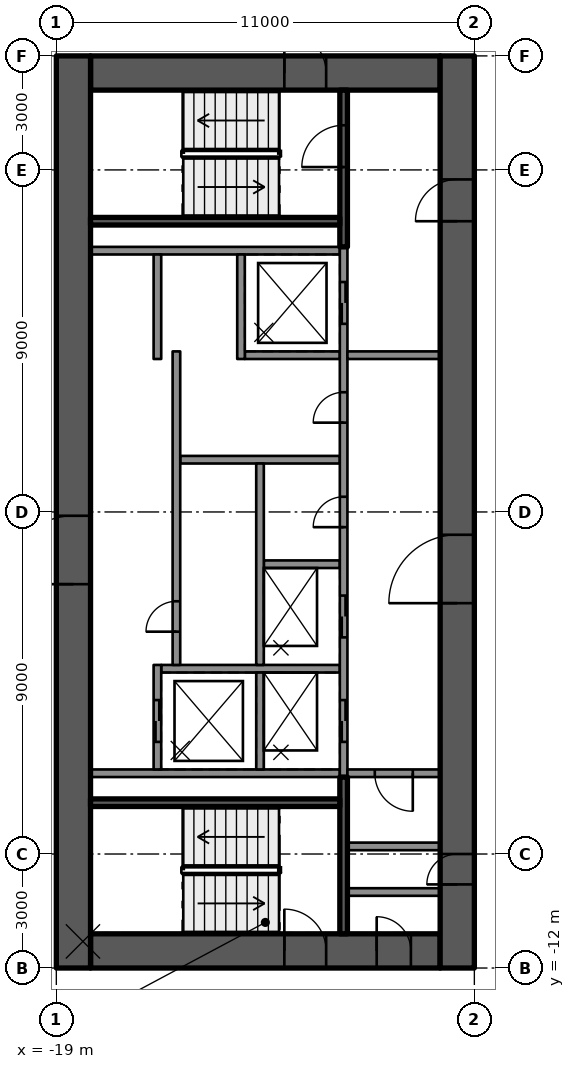
"""IFC4 building model, lengths in metres.
Left out: names, types, materials, properties, quantities, classifications, styles, units other than length and angle.
Written with IfcOpenShell. Run it as: python <this file> out.ifc"""

import sys

from ifc_helpers import new_model, si_unit, direction, frame, frame_2d, origin, place, context, subcontext, project, spatial, rectangle, extrude, element, fill, save


model = new_model("IFC4")
c1 = context("Model", 3, precision=1e-05, world=origin(), true_north=direction((0.0, 1.0)))
c2 = subcontext(c1, "Body", "Model", "MODEL_VIEW")
j1 = project(units=[si_unit("LENGTHUNIT", "METRE"), si_unit("PLANEANGLEUNIT", "RADIAN")], contexts=[c1])
p1 = place(None, origin())
s1 = spatial("IfcSite", under=j1, at=p1, CompositionType="ELEMENT")
p2 = place(p1, origin())
s2 = spatial("IfcBuilding", under=s1, at=p2, CompositionType="ELEMENT")
p3 = place(p2, frame((0.0, 0.0, 289.4)))
s3 = spatial("IfcBuildingStorey", under=s2, at=p3, CompositionType="ELEMENT", Elevation=289.4)
p4 = place(p3, frame((-18.1, 11.55, 0.0), z_axis=(0.0, 0.0, 1.0), x_axis=(1.0, 0.0, 0.0)))
e1 = element("IfcWall", 1, at=p4, inside=s3, PredefinedType="SHEAR", context=c2, shape_type="SweptSolid", body=[
    extrude(rectangle(XDim=9.2, YDim=0.9, at=frame_2d((4.6, 0.0))), origin(), (0.0, 0.0, 1.0), 3.5),
])
p5 = place(p4, frame((5.1, 0.0, 0.0)))
e2 = element("IfcOpeningElement", 2, at=p5, cuts=e1, PredefinedType="OPENING", context=c2, shape_type="SweptSolid", body=[
    extrude(rectangle(XDim=1.1, YDim=2.1, at=frame_2d((0.55, 1.05))), frame((0.0, 0.46, 0.0), z_axis=(0.0, -1.0, 0.0), x_axis=(1.0, 0.0, 0.0)), (0.0, 0.0, 1.0), 0.92),
])
p6 = place(p3, frame((-18.1, -11.55, 0.0), z_axis=(0.0, 0.0, 1.0), x_axis=(1.0, 0.0, 0.0)))
e3 = element("IfcWall", 3, at=p6, inside=s3, PredefinedType="SHEAR", context=c2, shape_type="SweptSolid", body=[
    extrude(rectangle(XDim=9.2, YDim=0.9, at=frame_2d((4.6, 0.0))), origin(), (0.0, 0.0, 1.0), 3.5),
])
p7 = place(p6, frame((5.1, 0.0, 0.0)))
e4 = element("IfcOpeningElement", 4, at=p7, cuts=e3, PredefinedType="OPENING", context=c2, shape_type="SweptSolid", body=[
    extrude(rectangle(XDim=1.1, YDim=2.1, at=frame_2d((0.55, 1.05))), frame((0.0, 0.46, 0.0), z_axis=(0.0, -1.0, 0.0), x_axis=(1.0, 0.0, 0.0)), (0.0, 0.0, 1.0), 0.92),
])
p8 = place(p6, frame((7.53, 0.0, 0.0)))
e5 = element("IfcOpeningElement", 5, at=p8, cuts=e3, PredefinedType="OPENING", context=c2, shape_type="SweptSolid", body=[
    extrude(rectangle(XDim=0.9, YDim=2.1, at=frame_2d((0.45, 1.05))), frame((0.0, 0.46, 0.0), z_axis=(0.0, -1.0, 0.0), x_axis=(1.0, 0.0, 0.0)), (0.0, 0.0, 1.0), 0.92),
])
p9 = place(p3, frame((-18.55, -12.0, 0.0), z_axis=(0.0, 0.0, 1.0), x_axis=(0.0, 1.0, 0.0)))
e6 = element("IfcWall", 6, at=p9, inside=s3, PredefinedType="SHEAR", context=c2, shape_type="SweptSolid", body=[
    extrude(rectangle(XDim=24.0, YDim=0.9, at=frame_2d((12.0, 0.0))), origin(), (0.0, 0.0, 1.0), 3.5),
])
p10 = place(p9, frame((10.1, 0.0, 0.0)))
e7 = element("IfcOpeningElement", 7, at=p10, cuts=e6, PredefinedType="OPENING", context=c2, shape_type="SweptSolid", body=[
    extrude(rectangle(XDim=1.8, YDim=2.1, at=frame_2d((0.9, 1.05))), frame((0.0, 0.46, 0.0), z_axis=(0.0, -1.0, 0.0), x_axis=(1.0, 0.0, 0.0)), (0.0, 0.0, 1.0), 0.92),
])
p11 = place(p3, frame((-8.45, -12.0, 0.0), z_axis=(0.0, 0.0, 1.0), x_axis=(0.0, 1.0, 0.0)))
e8 = element("IfcWall", 8, at=p11, inside=s3, PredefinedType="SHEAR", context=c2, shape_type="SweptSolid", body=[
    extrude(rectangle(XDim=24.0, YDim=0.9, at=frame_2d((12.0, 0.0))), origin(), (0.0, 0.0, 1.0), 3.5),
])
p12 = place(p11, frame((9.6, 0.0, 0.0)))
e9 = element("IfcOpeningElement", 9, at=p12, cuts=e8, PredefinedType="OPENING", context=c2, shape_type="SweptSolid", body=[
    extrude(rectangle(XDim=1.8, YDim=2.1, at=frame_2d((0.9, 1.05))), frame((0.0, 0.46, 0.0), z_axis=(0.0, -1.0, 0.0), x_axis=(1.0, 0.0, 0.0)), (0.0, 0.0, 1.0), 0.92),
])
p13 = place(p11, frame((19.65, 0.0, 0.0)))
e10 = element("IfcOpeningElement", 10, at=p13, cuts=e8, PredefinedType="OPENING", context=c2, shape_type="SweptSolid", body=[
    extrude(rectangle(XDim=1.1, YDim=2.1, at=frame_2d((0.55, 1.05))), frame((0.0, 0.46, 0.0), z_axis=(0.0, -1.0, 0.0), x_axis=(1.0, 0.0, 0.0)), (0.0, 0.0, 1.0), 0.92),
])
p14 = place(p11, frame((2.2, 0.0, 0.0)))
e11 = element("IfcOpeningElement", 11, at=p14, cuts=e8, PredefinedType="OPENING", context=c2, shape_type="SweptSolid", body=[
    extrude(rectangle(XDim=0.8, YDim=2.1, at=frame_2d((0.4, 1.05))), frame((0.0, 0.46, 0.0), z_axis=(0.0, -1.0, 0.0), x_axis=(1.0, 0.0, 0.0)), (0.0, 0.0, 1.0), 0.92),
])
for number, where, z_axis, x_axis in (
    (12, (-11.54, 6.875, 0.0), (0.0, 0.0, 1.0), (-1.0, 0.0, 0.0)),
    (13, (-11.54, -6.875, 0.0), (0.0, 0.0, 1.0), (-1.0, 0.0, 0.0)),
):
    element("IfcWall", number, at=place(p3, frame(where, z_axis=z_axis, x_axis=x_axis)), inside=s3, PredefinedType="SOLIDWALL", context=c2, shape_type="SweptSolid", body=[
        extrude(rectangle(XDim=6.56, YDim=0.2, at=frame_2d((3.28, 0.0))), origin(), (0.0, 0.0, 1.0), 3.09),
    ])
p15 = place(p3, frame((-11.54, -4.125, 0.0), z_axis=(0.0, 0.0, 1.0), x_axis=(-1.0, 0.0, 0.0)))
e14 = element("IfcWall", 14, at=p15, inside=s3, PredefinedType="SOLIDWALL", context=c2, shape_type="SweptSolid", body=[
    extrude(rectangle(XDim=4.7, YDim=0.2, at=frame_2d((2.35, 0.0))), origin(), (0.0, 0.0, 1.0), 3.09),
])
p16 = place(p3, frame((-11.54, -1.375, 0.0), z_axis=(0.0, 0.0, 1.0), x_axis=(-1.0, 0.0, 0.0)))
e15 = element("IfcWall", 15, at=p16, inside=s3, PredefinedType="SOLIDWALL", context=c2, shape_type="SweptSolid", body=[
    extrude(rectangle(XDim=2.0, YDim=0.2, at=frame_2d((1.0, 0.0))), origin(), (0.0, 0.0, 1.0), 3.09),
])
p17 = place(p3, frame((-11.54, 1.375, 0.0), z_axis=(0.0, 0.0, 1.0), x_axis=(-1.0, 0.0, 0.0)))
e16 = element("IfcWall", 16, at=p17, inside=s3, PredefinedType="SOLIDWALL", context=c2, shape_type="SweptSolid", body=[
    extrude(rectangle(XDim=4.2, YDim=0.2, at=frame_2d((2.1, 0.0))), origin(), (0.0, 0.0, 1.0), 3.09),
])
p18 = place(p3, frame((-11.54, 4.125, 0.0), z_axis=(0.0, 0.0, 1.0), x_axis=(-1.0, 0.0, 0.0)))
e17 = element("IfcWall", 17, at=p18, inside=s3, PredefinedType="SOLIDWALL", context=c2, shape_type="SweptSolid", body=[
    extrude(rectangle(XDim=2.5, YDim=0.2, at=frame_2d((1.25, 0.0))), origin(), (0.0, 0.0, 1.0), 3.09),
])
p19 = place(p3, frame((-11.44, -6.975, 0.0), z_axis=(0.0, 0.0, 1.0), x_axis=(0.0, 1.0, 0.0)))
e18 = element("IfcWall", 18, at=p19, inside=s3, PredefinedType="SOLIDWALL", context=c2, shape_type="SweptSolid", body=[
    extrude(rectangle(XDim=13.95, YDim=0.2, at=frame_2d((6.975, 0.0))), origin(), (0.0, 0.0, 1.0), 3.09),
])
p20 = place(p19, frame((0.925, 0.0, 0.0)))
e19 = element("IfcOpeningElement", 19, at=p20, cuts=e18, PredefinedType="OPENING", context=c2, shape_type="SweptSolid", body=[
    extrude(rectangle(XDim=1.1, YDim=2.1, at=frame_2d((0.55, 1.05))), frame((0.0, 0.11, 0.0), z_axis=(0.0, -1.0, 0.0), x_axis=(1.0, 0.0, 0.0)), (0.0, 0.0, 1.0), 0.22),
])
p21 = place(p19, frame((3.675, 0.0, 0.0)))
e20 = element("IfcOpeningElement", 20, at=p21, cuts=e18, PredefinedType="OPENING", context=c2, shape_type="SweptSolid", body=[
    extrude(rectangle(XDim=1.1, YDim=2.1, at=frame_2d((0.55, 1.05))), frame((0.0, 0.11, 0.0), z_axis=(0.0, -1.0, 0.0), x_axis=(1.0, 0.0, 0.0)), (0.0, 0.0, 1.0), 0.22),
])
p22 = place(p19, frame((11.925, 0.0, 0.0)))
e21 = element("IfcOpeningElement", 21, at=p22, cuts=e18, PredefinedType="OPENING", context=c2, shape_type="SweptSolid", body=[
    extrude(rectangle(XDim=1.1, YDim=2.1, at=frame_2d((0.55, 1.05))), frame((0.0, 0.11, 0.0), z_axis=(0.0, -1.0, 0.0), x_axis=(1.0, 0.0, 0.0)), (0.0, 0.0, 1.0), 0.22),
])
p23 = place(p19, frame((6.575, 0.0, 0.0)))
e22 = element("IfcOpeningElement", 22, at=p23, cuts=e18, PredefinedType="OPENING", context=c2, shape_type="SweptSolid", body=[
    extrude(rectangle(XDim=0.8, YDim=2.1, at=frame_2d((0.4, 1.05))), frame((0.0, 0.11, 0.0), z_axis=(0.0, -1.0, 0.0), x_axis=(1.0, 0.0, 0.0)), (0.0, 0.0, 1.0), 0.22),
])
p24 = place(p19, frame((9.325, 0.0, 0.0)))
e23 = element("IfcOpeningElement", 23, at=p24, cuts=e18, PredefinedType="OPENING", context=c2, shape_type="SweptSolid", body=[
    extrude(rectangle(XDim=0.8, YDim=2.1, at=frame_2d((0.4, 1.05))), frame((0.0, 0.11, 0.0), z_axis=(0.0, -1.0, 0.0), x_axis=(1.0, 0.0, 0.0)), (0.0, 0.0, 1.0), 0.22),
])
p25 = place(p3, frame((-13.64, -6.775, 0.0), z_axis=(0.0, 0.0, 1.0), x_axis=(0.0, 1.0, 0.0)))
e24 = element("IfcWall", 24, at=p25, inside=s3, PredefinedType="SOLIDWALL", context=c2, shape_type="SweptSolid", body=[
    extrude(rectangle(XDim=2.55, YDim=0.2, at=frame_2d((1.275, 0.0))), origin(), (0.0, 0.0, 1.0), 3.09),
])
p26 = place(p3, frame((-13.64, -4.025, 0.0), z_axis=(0.0, 0.0, 1.0), x_axis=(0.0, 1.0, 0.0)))
e25 = element("IfcWall", 25, at=p26, inside=s3, PredefinedType="SOLIDWALL", context=c2, shape_type="SweptSolid", body=[
    extrude(rectangle(XDim=5.3, YDim=0.2, at=frame_2d((2.65, 0.0))), origin(), (0.0, 0.0, 1.0), 3.09),
])
p27 = place(p3, frame((-14.14, 4.025, 0.0), z_axis=(0.0, 0.0, 1.0), x_axis=(0.0, 1.0, 0.0)))
e26 = element("IfcWall", 26, at=p27, inside=s3, PredefinedType="SOLIDWALL", context=c2, shape_type="SweptSolid", body=[
    extrude(rectangle(XDim=2.75, YDim=0.2, at=frame_2d((1.375, 0.0))), origin(), (0.0, 0.0, 1.0), 3.09),
])
p28 = place(p3, frame((-16.34, -6.775, 0.0), z_axis=(0.0, 0.0, 1.0), x_axis=(0.0, 1.0, 0.0)))
e27 = element("IfcWall", 27, at=p28, inside=s3, PredefinedType="SOLIDWALL", context=c2, shape_type="SweptSolid", body=[
    extrude(rectangle(XDim=2.75, YDim=0.2, at=frame_2d((1.375, 0.0))), origin(), (0.0, 0.0, 1.0), 3.09),
])
p29 = place(p28, frame((0.725, 0.0, 0.0)))
e28 = element("IfcOpeningElement", 28, at=p29, cuts=e27, PredefinedType="OPENING", context=c2, shape_type="SweptSolid", body=[
    extrude(rectangle(XDim=1.1, YDim=2.1, at=frame_2d((0.55, 1.05))), frame((0.0, 0.11, 0.0), z_axis=(0.0, -1.0, 0.0), x_axis=(1.0, 0.0, 0.0)), (0.0, 0.0, 1.0), 0.22),
])
p30 = place(p3, frame((-15.84, -4.025, 0.0), z_axis=(0.0, 0.0, 1.0), x_axis=(0.0, 1.0, 0.0)))
e29 = element("IfcWall", 29, at=p30, inside=s3, PredefinedType="SOLIDWALL", context=c2, shape_type="SweptSolid", body=[
    extrude(rectangle(XDim=8.25, YDim=0.2, at=frame_2d((4.125, 0.0))), origin(), (0.0, 0.0, 1.0), 3.09),
])
p31 = place(p30, frame((0.875, 0.0, 0.0)))
e30 = element("IfcOpeningElement", 30, at=p31, cuts=e29, PredefinedType="OPENING", context=c2, shape_type="SweptSolid", body=[
    extrude(rectangle(XDim=0.8, YDim=2.1, at=frame_2d((0.4, 1.05))), frame((0.0, 0.11, 0.0), z_axis=(0.0, -1.0, 0.0), x_axis=(1.0, 0.0, 0.0)), (0.0, 0.0, 1.0), 0.22),
])
p32 = place(p3, frame((-16.34, 4.025, 0.0), z_axis=(0.0, 0.0, 1.0), x_axis=(0.0, 1.0, 0.0)))
e31 = element("IfcWall", 31, at=p32, inside=s3, PredefinedType="SOLIDWALL", context=c2, shape_type="SweptSolid", body=[
    extrude(rectangle(XDim=2.75, YDim=0.2, at=frame_2d((1.375, 0.0))), origin(), (0.0, 0.0, 1.0), 3.09),
])
p33 = place(p3, frame((-11.44, 6.975, 0.0), z_axis=(0.0, 0.0, 1.0), x_axis=(0.0, 1.0, 0.0)))
e32 = element("IfcWall", 32, at=p33, inside=s3, PredefinedType="SOLIDWALL", context=c2, shape_type="SweptSolid", body=[
    extrude(rectangle(XDim=4.125, YDim=0.2, at=frame_2d((2.062, 0.0))), origin(), (0.0, 0.0, 1.0), 3.09),
])
p34 = place(p33, frame((2.1, 0.0, 0.0)))
e33 = element("IfcOpeningElement", 33, at=p34, cuts=e32, PredefinedType="OPENING", context=c2, shape_type="SweptSolid", body=[
    extrude(rectangle(XDim=1.1, YDim=2.1, at=frame_2d((0.55, 1.05))), frame((0.0, 0.11, 0.0), z_axis=(0.0, -1.0, 0.0), x_axis=(1.0, 0.0, 0.0)), (0.0, 0.0, 1.0), 0.22),
])
p35 = place(p3, frame((-11.54, 7.65, 0.0), z_axis=(0.0, 0.0, 1.0), x_axis=(-1.0, 0.0, 0.0)))
e34 = element("IfcWall", 34, at=p35, inside=s3, PredefinedType="SOLIDWALL", context=c2, shape_type="SweptSolid", body=[
    extrude(rectangle(XDim=6.56, YDim=0.2, at=frame_2d((3.28, 0.0))), origin(), (0.0, 0.0, 1.0), 3.09),
])
p36 = place(p3, frame((-11.44, -11.1, 0.0), z_axis=(0.0, 0.0, 1.0), x_axis=(0.0, 1.0, 0.0)))
e35 = element("IfcWall", 35, at=p36, inside=s3, PredefinedType="SOLIDWALL", context=c2, shape_type="SweptSolid", body=[
    extrude(rectangle(XDim=4.125, YDim=0.2, at=frame_2d((2.062, 0.0))), origin(), (0.0, 0.0, 1.0), 3.09),
])
p37 = place(p3, frame((-11.54, -7.65, 0.0), z_axis=(0.0, 0.0, 1.0), x_axis=(-1.0, 0.0, 0.0)))
e36 = element("IfcWall", 36, at=p37, inside=s3, PredefinedType="SOLIDWALL", context=c2, shape_type="SweptSolid", body=[
    extrude(rectangle(XDim=6.56, YDim=0.2, at=frame_2d((3.28, 0.0))), origin(), (0.0, 0.0, 1.0), 3.09),
])
p38 = place(p3, frame((-8.9, 4.125, 0.0), z_axis=(0.0, 0.0, 1.0), x_axis=(-1.0, 0.0, 0.0)))
e37 = element("IfcWall", 37, at=p38, inside=s3, PredefinedType="PARTITIONING", context=c2, shape_type="SweptSolid", body=[
    extrude(rectangle(XDim=2.44, YDim=0.2, at=frame_2d((1.22, 0.0))), origin(), (0.0, 0.0, 1.0), 3.09),
])
p39 = place(p3, frame((-8.9, -6.875, 0.0), z_axis=(0.0, 0.0, 1.0), x_axis=(-1.0, 0.0, 0.0)))
e38 = element("IfcWall", 38, at=p39, inside=s3, PredefinedType="PARTITIONING", context=c2, shape_type="SweptSolid", body=[
    extrude(rectangle(XDim=2.44, YDim=0.2, at=frame_2d((1.22, 0.0))), origin(), (0.0, 0.0, 1.0), 3.09),
])
p40 = place(p39, frame((0.72, 0.0, 0.0)))
e39 = element("IfcOpeningElement", 39, at=p40, cuts=e38, PredefinedType="OPENING", context=c2, shape_type="SweptSolid", body=[
    extrude(rectangle(XDim=1.0, YDim=2.1, at=frame_2d((0.5, 1.05))), frame((0.0, 0.11, 0.0), z_axis=(0.0, -1.0, 0.0), x_axis=(1.0, 0.0, 0.0)), (0.0, 0.0, 1.0), 0.22),
])
for number, where, z_axis, x_axis in (
    (40, (-8.9, -10.0, 0.0), (0.0, 0.0, 1.0), (-1.0, 0.0, 0.0)),
    (41, (-8.9, -8.8, 0.0), (0.0, 0.0, 1.0), (-1.0, 0.0, 0.0)),
):
    element("IfcWall", number, at=place(p3, frame(where, z_axis=z_axis, x_axis=x_axis)), inside=s3, PredefinedType="PARTITIONING", context=c2, shape_type="SweptSolid", body=[
        extrude(rectangle(XDim=2.44, YDim=0.2, at=frame_2d((1.22, 0.0))), origin(), (0.0, 0.0, 1.0), 3.09),
    ])
p41 = place(p20, origin())
e42 = element("IfcDoor", 42, at=p41, inside=s3, OperationType="DOUBLE_DOOR_SLIDING", PredefinedType="DOOR", context=c2, shape_type="SweptSolid", body=[
    extrude(rectangle(XDim=1.1, YDim=2.1, at=frame_2d((0.55, 1.05))), frame((0.0, 0.025, 0.0), z_axis=(0.0, -1.0, 0.0), x_axis=(1.0, 0.0, 0.0)), (0.0, 0.0, 1.0), 0.05),
])
fill(e19, e42)
p42 = place(p29, origin())
e43 = element("IfcDoor", 43, at=p42, inside=s3, OperationType="DOUBLE_DOOR_SLIDING", PredefinedType="DOOR", context=c2, shape_type="SweptSolid", body=[
    extrude(rectangle(XDim=1.1, YDim=2.1, at=frame_2d((0.55, 1.05))), frame((0.0, 0.025, 0.0), z_axis=(0.0, -1.0, 0.0), x_axis=(1.0, 0.0, 0.0)), (0.0, 0.0, 1.0), 0.05),
])
fill(e28, e43)
p43 = place(p21, origin())
e44 = element("IfcDoor", 44, at=p43, inside=s3, OperationType="DOUBLE_DOOR_SLIDING", PredefinedType="DOOR", context=c2, shape_type="SweptSolid", body=[
    extrude(rectangle(XDim=1.1, YDim=2.1, at=frame_2d((0.55, 1.05))), frame((0.0, 0.025, 0.0), z_axis=(0.0, -1.0, 0.0), x_axis=(1.0, 0.0, 0.0)), (0.0, 0.0, 1.0), 0.05),
])
fill(e20, e44)
p44 = place(p22, origin())
e45 = element("IfcDoor", 45, at=p44, inside=s3, OperationType="DOUBLE_DOOR_SLIDING", PredefinedType="DOOR", context=c2, shape_type="SweptSolid", body=[
    extrude(rectangle(XDim=1.1, YDim=2.1, at=frame_2d((0.55, 1.05))), frame((0.0, 0.025, 0.0), z_axis=(0.0, -1.0, 0.0), x_axis=(1.0, 0.0, 0.0)), (0.0, 0.0, 1.0), 0.05),
])
fill(e21, e45)
p45 = place(p31, origin())
e46 = element("IfcDoor", 46, at=p45, inside=s3, OperationType="SINGLE_SWING_LEFT", PredefinedType="DOOR", context=c2, shape_type="SweptSolid", body=[
    extrude(rectangle(XDim=0.8, YDim=2.1, at=frame_2d((0.4, 1.05))), frame((0.0, 0.025, 0.0), z_axis=(0.0, -1.0, 0.0), x_axis=(1.0, 0.0, 0.0)), (0.0, 0.0, 1.0), 0.05),
])
fill(e30, e46)
p46 = place(p23, origin())
e47 = element("IfcDoor", 47, at=p46, inside=s3, OperationType="SINGLE_SWING_LEFT", PredefinedType="DOOR", context=c2, shape_type="SweptSolid", body=[
    extrude(rectangle(XDim=0.8, YDim=2.1, at=frame_2d((0.4, 1.05))), frame((0.0, 0.025, 0.0), z_axis=(0.0, -1.0, 0.0), x_axis=(1.0, 0.0, 0.0)), (0.0, 0.0, 1.0), 0.05),
])
fill(e22, e47)
p47 = place(p24, origin())
e48 = element("IfcDoor", 48, at=p47, inside=s3, OperationType="SINGLE_SWING_LEFT", PredefinedType="DOOR", context=c2, shape_type="SweptSolid", body=[
    extrude(rectangle(XDim=0.8, YDim=2.1, at=frame_2d((0.4, 1.05))), frame((0.0, 0.025, 0.0), z_axis=(0.0, -1.0, 0.0), x_axis=(1.0, 0.0, 0.0)), (0.0, 0.0, 1.0), 0.05),
])
fill(e23, e48)
p48 = place(p12, origin())
e49 = element("IfcDoor", 49, at=p48, inside=s3, OperationType="SINGLE_SWING_LEFT", PredefinedType="DOOR", context=c2, shape_type="SweptSolid", body=[
    extrude(rectangle(XDim=1.8, YDim=2.1, at=frame_2d((0.9, 1.05))), frame((0.0, 0.025, 0.0), z_axis=(0.0, -1.0, 0.0), x_axis=(1.0, 0.0, 0.0)), (0.0, 0.0, 1.0), 0.05),
])
fill(e9, e49)
p49 = place(p10, origin())
e50 = element("IfcDoor", 50, at=p49, inside=s3, OperationType="SINGLE_SWING_LEFT", PredefinedType="DOOR", context=c2, shape_type="SweptSolid", body=[
    extrude(rectangle(XDim=1.8, YDim=2.1, at=frame_2d((0.9, 1.05))), frame((0.0, 0.025, 0.0), z_axis=(0.0, -1.0, 0.0), x_axis=(1.0, 0.0, 0.0)), (0.0, 0.0, 1.0), 0.05),
])
fill(e7, e50)
p50 = place(p13, origin())
e51 = element("IfcDoor", 51, at=p50, inside=s3, OperationType="SINGLE_SWING_RIGHT", PredefinedType="DOOR", context=c2, shape_type="SweptSolid", body=[
    extrude(rectangle(XDim=1.1, YDim=2.1, at=frame_2d((0.55, 1.05))), frame((0.0, 0.025, 0.0), z_axis=(0.0, -1.0, 0.0), x_axis=(1.0, 0.0, 0.0)), (0.0, 0.0, 1.0), 0.05),
])
fill(e10, e51)
p51 = place(p5, origin())
e52 = element("IfcDoor", 52, at=p51, inside=s3, OperationType="SINGLE_SWING_RIGHT", PredefinedType="DOOR", context=c2, shape_type="SweptSolid", body=[
    extrude(rectangle(XDim=1.1, YDim=2.1, at=frame_2d((0.55, 1.05))), frame((0.0, 0.025, 0.0), z_axis=(0.0, -1.0, 0.0), x_axis=(1.0, 0.0, 0.0)), (0.0, 0.0, 1.0), 0.05),
])
fill(e2, e52)
p52 = place(p7, origin())
e53 = element("IfcDoor", 53, at=p52, inside=s3, OperationType="SINGLE_SWING_RIGHT", PredefinedType="DOOR", context=c2, shape_type="SweptSolid", body=[
    extrude(rectangle(XDim=1.1, YDim=2.1, at=frame_2d((0.55, 1.05))), frame((0.0, 0.025, 0.0), z_axis=(0.0, -1.0, 0.0), x_axis=(1.0, 0.0, 0.0)), (0.0, 0.0, 1.0), 0.05),
])
fill(e4, e53)
p53 = place(p34, origin())
e54 = element("IfcDoor", 54, at=p53, inside=s3, OperationType="SINGLE_SWING_RIGHT", PredefinedType="DOOR", context=c2, shape_type="SweptSolid", body=[
    extrude(rectangle(XDim=1.1, YDim=2.1, at=frame_2d((0.55, 1.05))), frame((0.0, 0.025, 0.0), z_axis=(0.0, -1.0, 0.0), x_axis=(1.0, 0.0, 0.0)), (0.0, 0.0, 1.0), 0.05),
])
fill(e33, e54)
p54 = place(p8, origin())
e55 = element("IfcDoor", 55, at=p54, inside=s3, OperationType="SINGLE_SWING_RIGHT", PredefinedType="DOOR", context=c2, shape_type="SweptSolid", body=[
    extrude(rectangle(XDim=0.9, YDim=2.1, at=frame_2d((0.45, 1.05))), frame((0.0, 0.025, 0.0), z_axis=(0.0, -1.0, 0.0), x_axis=(1.0, 0.0, 0.0)), (0.0, 0.0, 1.0), 0.05),
])
fill(e5, e55)
p55 = place(p14, origin())
e56 = element("IfcDoor", 56, at=p55, inside=s3, OperationType="SINGLE_SWING_LEFT", PredefinedType="DOOR", context=c2, shape_type="SweptSolid", body=[
    extrude(rectangle(XDim=0.8, YDim=2.1, at=frame_2d((0.4, 1.05))), frame((0.0, 0.025, 0.0), z_axis=(0.0, -1.0, 0.0), x_axis=(1.0, 0.0, 0.0)), (0.0, 0.0, 1.0), 0.05),
])
fill(e11, e56)
p56 = place(p40, origin())
e57 = element("IfcDoor", 57, at=p56, inside=s3, OperationType="SINGLE_SWING_RIGHT", PredefinedType="DOOR", context=c2, shape_type="SweptSolid", body=[
    extrude(rectangle(XDim=1.0, YDim=2.1, at=frame_2d((0.5, 1.05))), frame((0.0, 0.025, 0.0), z_axis=(0.0, -1.0, 0.0), x_axis=(1.0, 0.0, 0.0)), (0.0, 0.0, 1.0), 0.05),
])
fill(e39, e57)
save(model, sys.argv[1])
